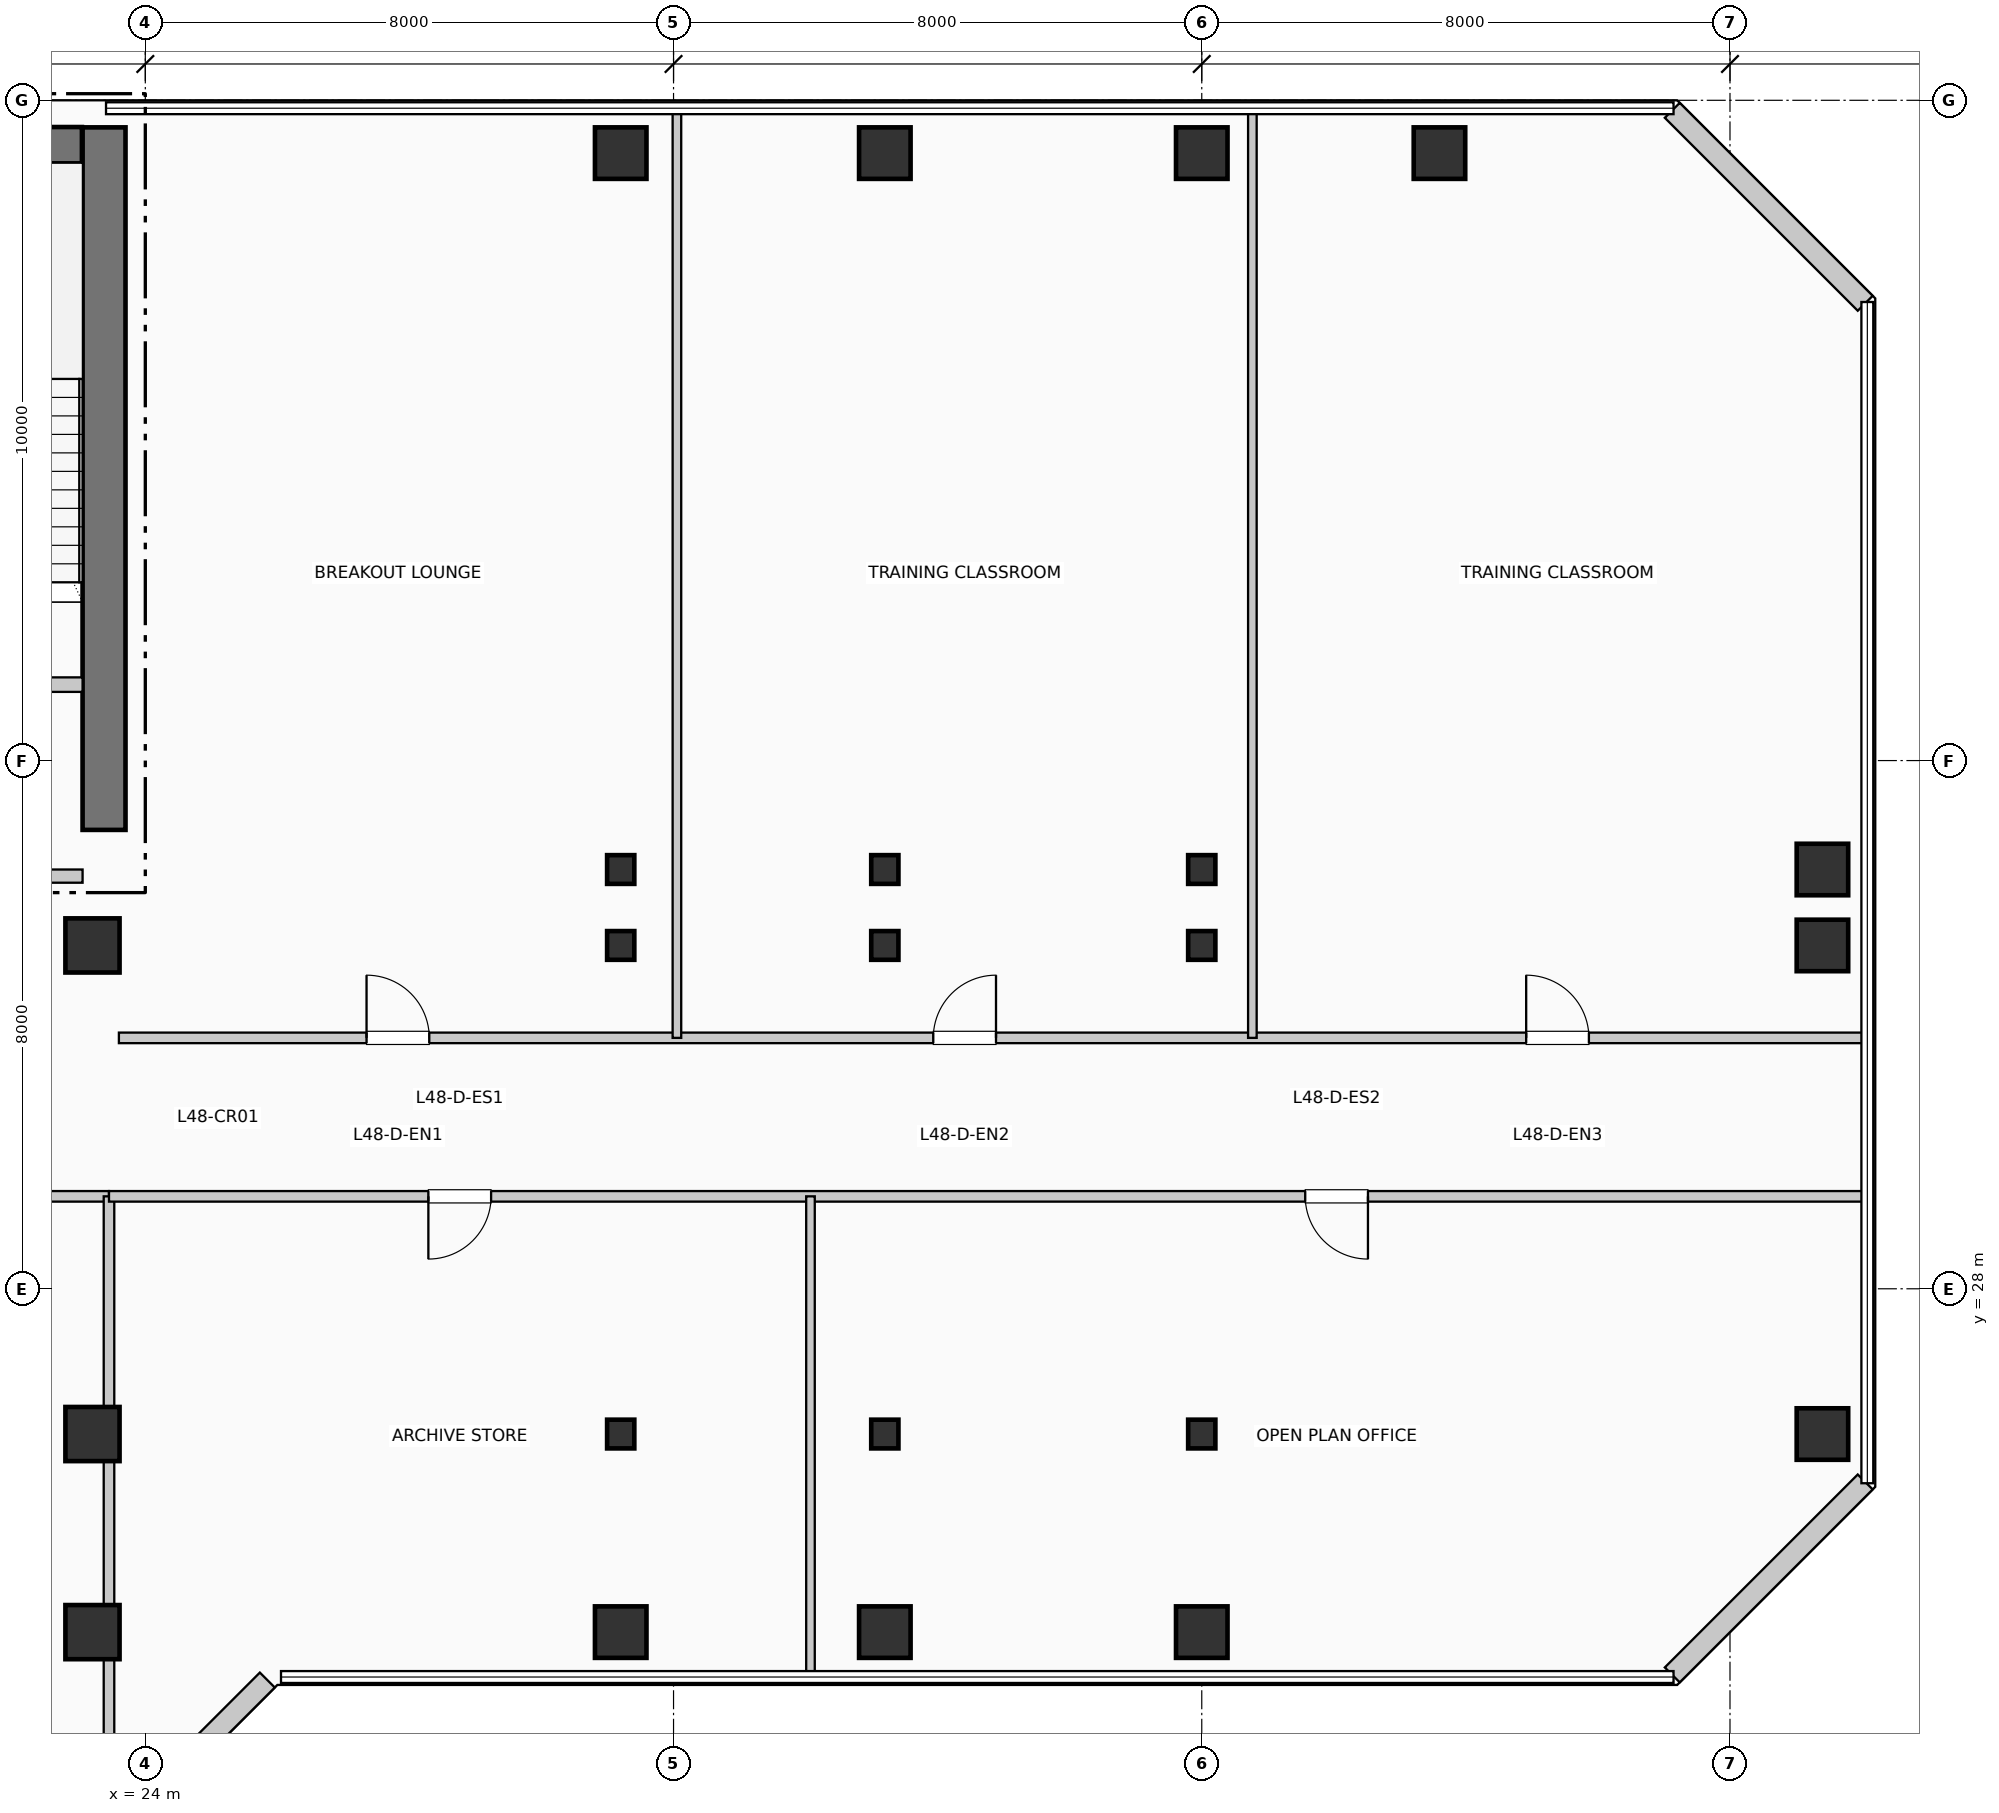
"""IFC4 building model, lengths in metres.
Left out: names, types, materials, properties, quantities, classifications, styles, units other than length and angle.
Written with IfcOpenShell. Run it as: python <this file> out.ifc"""

import sys

from ifc_helpers import new_model, si_unit, direction, frame, frame_2d, origin, origin_2d, place, context, subcontext, project, spatial, rectangle, i_section, extrude, element, fill, save


model = new_model("IFC4")
c1 = context("Model", 3, precision=1e-05, world=origin(), true_north=direction((0.0, 1.0)))
c2 = subcontext(c1, "Body", "Model", "MODEL_VIEW")
j1 = project(units=[si_unit("LENGTHUNIT", "METRE"), si_unit("PLANEANGLEUNIT", "RADIAN")], contexts=[c1])
p1 = place(None, origin())
s1 = spatial("IfcSite", under=j1, at=p1, CompositionType="ELEMENT")
p2 = place(p1, origin())
s2 = spatial("IfcBuilding", under=s1, at=p2, CompositionType="ELEMENT")
p3 = place(p2, frame((0.0, 0.0, 199.32)))
s3 = spatial("IfcBuildingStorey", under=s2, at=p3, CompositionType="ELEMENT", Elevation=199.32)
p4 = place(p3, frame((23.375, 34.95, 0.0), z_axis=(0.0, 0.0, 1.0), x_axis=(0.0, 1.0, 0.0)))
e1 = element("IfcWall", 1, at=p4, inside=s3, PredefinedType="SHEAR", context=c2, shape_type="SweptSolid", body=[
    extrude(rectangle(XDim=10.64, YDim=0.65, at=frame_2d((5.32, 0.0))), origin(), (0.0, 0.0, 1.0), 3.96),
])
p5 = place(p3, frame((19.35, 45.32, 0.0), z_axis=(0.0, 0.0, 1.0), x_axis=(1.0, 0.0, 0.0)))
e2 = element("IfcWall", 2, at=p5, inside=s3, PredefinedType="SHEAR", context=c2, shape_type="SweptSolid", body=[
    extrude(rectangle(XDim=3.69, YDim=0.55, at=frame_2d((1.845, 0.0))), origin(), (0.0, 0.0, 1.0), 3.96),
])
p6 = place(p5, frame((1.15, 0.0, 1.05)))
e3 = element("IfcOpeningElement", 3, at=p6, cuts=e2, PredefinedType="OPENING", context=c2, shape_type="SweptSolid", body=[
    extrude(rectangle(XDim=1.4, YDim=1.8, at=frame_2d((0.7, 0.9))), frame((0.0, 0.285, 0.0), z_axis=(0.0, -1.0, 0.0), x_axis=(1.0, 0.0, 0.0)), (0.0, 0.0, 1.0), 0.57),
])
for number, where, z_axis, x_axis in (
    (4, (23.2, 22.8, 0.0), (0.0, 0.0, 1.0), (1.0, 0.0, 0.0)),
    (5, (23.2, 25.8, 0.0), (0.0, 0.0, 1.0), (1.0, 0.0, 0.0)),
    (6, (23.2, 33.2, 0.0), (0.0, 0.0, 1.0), (1.0, 0.0, 0.0)),
):
    element("IfcColumn", number, at=place(p3, frame(where, z_axis=z_axis, x_axis=x_axis)), inside=s3, PredefinedType="COLUMN", context=c2, shape_type="SweptSolid", body=[
        extrude(rectangle(XDim=0.82, YDim=0.82, at=origin_2d()), origin(), (0.0, 0.0, 1.0), 3.96),
    ])
p7 = place(p3, frame((31.2, 22.8, 0.0), z_axis=(0.0, 0.0, 1.0), x_axis=(1.0, 0.0, 0.0)))
e7 = element("IfcColumn", 7, at=p7, inside=s3, PredefinedType="COLUMN", context=c2, shape_type="SweptSolid", body=[
    extrude(rectangle(XDim=0.78, YDim=0.78, at=origin_2d()), origin(), (0.0, 0.0, 1.0), 3.96),
])
for number, where, z_axis, x_axis in (
    (8, (31.2, 25.8, 0.0), (0.0, 0.0, 1.0), (1.0, 0.0, 0.0)),
    (9, (31.2, 33.2, 0.0), (0.0, 0.0, 1.0), (1.0, 0.0, 0.0)),
    (10, (31.2, 34.35, 0.0), (0.0, 0.0, 1.0), (1.0, 0.0, 0.0)),
):
    element("IfcColumn", number, at=place(p3, frame(where, z_axis=z_axis, x_axis=x_axis)), inside=s3, PredefinedType="COLUMN", context=c2, shape_type="SweptSolid", body=[
        extrude(i_section(OverallWidth=0.412, OverallDepth=0.435, WebThickness=0.027, FlangeThickness=0.043, at=origin_2d()), origin(), (0.0, 0.0, 1.0), 3.96),
    ])
for number, where, z_axis, x_axis in (
    (11, (31.2, 45.2, 0.0), (0.0, 0.0, 1.0), (1.0, 0.0, 0.0)),
    (12, (35.2, 22.8, 0.0), (0.0, 0.0, 1.0), (1.0, 0.0, 0.0)),
):
    element("IfcColumn", number, at=place(p3, frame(where, z_axis=z_axis, x_axis=x_axis)), inside=s3, PredefinedType="COLUMN", context=c2, shape_type="SweptSolid", body=[
        extrude(rectangle(XDim=0.78, YDim=0.78, at=origin_2d()), origin(), (0.0, 0.0, 1.0), 3.96),
    ])
for number, where, z_axis, x_axis in (
    (13, (35.2, 25.8, 0.0), (0.0, 0.0, 1.0), (1.0, 0.0, 0.0)),
    (14, (35.2, 33.2, 0.0), (0.0, 0.0, 1.0), (1.0, 0.0, 0.0)),
    (15, (35.2, 34.35, 0.0), (0.0, 0.0, 1.0), (1.0, 0.0, 0.0)),
):
    element("IfcColumn", number, at=place(p3, frame(where, z_axis=z_axis, x_axis=x_axis)), inside=s3, PredefinedType="COLUMN", context=c2, shape_type="SweptSolid", body=[
        extrude(i_section(OverallWidth=0.412, OverallDepth=0.435, WebThickness=0.027, FlangeThickness=0.043, at=origin_2d()), origin(), (0.0, 0.0, 1.0), 3.96),
    ])
for number, where, z_axis, x_axis in (
    (16, (35.2, 45.2, 0.0), (0.0, 0.0, 1.0), (1.0, 0.0, 0.0)),
    (17, (40.0, 22.8, 0.0), (0.0, 0.0, 1.0), (1.0, 0.0, 0.0)),
):
    element("IfcColumn", number, at=place(p3, frame(where, z_axis=z_axis, x_axis=x_axis)), inside=s3, PredefinedType="COLUMN", context=c2, shape_type="SweptSolid", body=[
        extrude(rectangle(XDim=0.78, YDim=0.78, at=origin_2d()), origin(), (0.0, 0.0, 1.0), 3.96),
    ])
for number, where, z_axis, x_axis in (
    (18, (40.0, 25.8, 0.0), (0.0, 0.0, 1.0), (1.0, 0.0, 0.0)),
    (19, (40.0, 33.2, 0.0), (0.0, 0.0, 1.0), (1.0, 0.0, 0.0)),
    (20, (40.0, 34.35, 0.0), (0.0, 0.0, 1.0), (1.0, 0.0, 0.0)),
):
    element("IfcColumn", number, at=place(p3, frame(where, z_axis=z_axis, x_axis=x_axis)), inside=s3, PredefinedType="COLUMN", context=c2, shape_type="SweptSolid", body=[
        extrude(i_section(OverallWidth=0.412, OverallDepth=0.435, WebThickness=0.027, FlangeThickness=0.043, at=origin_2d()), origin(), (0.0, 0.0, 1.0), 3.96),
    ])
for number, where, z_axis, x_axis in (
    (21, (40.0, 45.2, 0.0), (0.0, 0.0, 1.0), (1.0, 0.0, 0.0)),
    (22, (43.6, 45.2, 0.0), (0.0, 0.0, 1.0), (1.0, 0.0, 0.0)),
    (23, (49.4, 25.8, 0.0), (0.0, 0.0, 1.0), (1.0, 0.0, 0.0)),
    (24, (49.4, 33.2, 0.0), (0.0, 0.0, 1.0), (1.0, 0.0, 0.0)),
    (25, (49.4, 34.35, 0.0), (0.0, 0.0, 1.0), (1.0, 0.0, 0.0)),
):
    element("IfcColumn", number, at=place(p3, frame(where, z_axis=z_axis, x_axis=x_axis)), inside=s3, PredefinedType="COLUMN", context=c2, shape_type="SweptSolid", body=[
        extrude(rectangle(XDim=0.78, YDim=0.78, at=origin_2d()), origin(), (0.0, 0.0, 1.0), 3.96),
    ])
p8 = place(p3, frame((23.926, 20.152, 0.0), z_axis=(0.0, 0.0, 1.0), x_axis=(0.707106781187, 0.707106781187, 0.0)))
e26 = element("IfcWall", 26, at=p8, inside=s3, PredefinedType="SOLIDWALL", context=c2, shape_type="SweptSolid", body=[
    extrude(rectangle(XDim=2.718, YDim=0.32, at=frame_2d((1.359, 0.0))), origin(), (0.0, 0.0, 1.0), 3.71),
])
for number, where, z_axis, x_axis in (
    (27, (47.126, 22.152, 0.0), (0.0, 0.0, 1.0), (0.707, 0.707, 0.0)),
    (28, (50.048, 42.926, 0.0), (0.0, 0.0, 1.0), (-0.707, 0.707, 0.0)),
):
    element("IfcWall", number, at=place(p3, frame(where, z_axis=z_axis, x_axis=x_axis)), inside=s3, PredefinedType="SOLIDWALL", context=c2, shape_type="SweptSolid", body=[
        extrude(rectangle(XDim=4.133, YDim=0.32, at=frame_2d((2.066, 0.0))), origin(), (0.0, 0.0, 1.0), 3.71),
    ])
p9 = place(p3, frame((19.9, 37.15, 0.0), z_axis=(0.0, 0.0, 1.0), x_axis=(1.0, 0.0, 0.0)))
e29 = element("IfcWall", 29, at=p9, inside=s3, PredefinedType="PARTITIONING", context=c2, shape_type="SweptSolid", body=[
    extrude(rectangle(XDim=3.15, YDim=0.22, at=frame_2d((1.575, 0.0))), origin(), (0.0, 0.0, 1.0), 3.71),
])
p10 = place(p9, frame((2.05, 0.0, 0.0), z_axis=(0.0, 0.0, 1.0), x_axis=(-1.0, 0.0, 0.0)))
e30 = element("IfcOpeningElement", 30, at=p10, cuts=e29, PredefinedType="OPENING", context=c2, shape_type="SweptSolid", body=[
    extrude(rectangle(XDim=1.05, YDim=2.15, at=frame_2d((0.525, 1.075))), frame((0.0, 0.12, 0.0), z_axis=(0.0, -1.0, 0.0), x_axis=(1.0, 0.0, 0.0)), (0.0, 0.0, 1.0), 0.24),
])
p11 = place(p3, frame((19.8, 34.25, 0.0), z_axis=(0.0, 0.0, 1.0), x_axis=(1.0, 0.0, 0.0)))
e31 = element("IfcWall", 31, at=p11, inside=s3, PredefinedType="PARTITIONING", context=c2, shape_type="SweptSolid", body=[
    extrude(rectangle(XDim=3.25, YDim=0.2, at=frame_2d((1.625, 0.0))), origin(), (0.0, 0.0, 1.0), 3.71),
])
p12 = place(p11, frame((2.15, 0.0, 0.0), z_axis=(0.0, 0.0, 1.0), x_axis=(-1.0, 0.0, 0.0)))
e32 = element("IfcOpeningElement", 32, at=p12, cuts=e31, PredefinedType="OPENING", context=c2, shape_type="SweptSolid", body=[
    extrude(rectangle(XDim=1.1, YDim=2.15, at=frame_2d((0.55, 1.075))), frame((0.0, 0.11, 0.0), z_axis=(0.0, -1.0, 0.0), x_axis=(1.0, 0.0, 0.0)), (0.0, 0.0, 1.0), 0.22),
])
p13 = place(p3, frame((11.64, 29.4, 0.0), z_axis=(0.0, 0.0, 1.0), x_axis=(1.0, 0.0, 0.0)))
e33 = element("IfcWall", 33, at=p13, inside=s3, PredefinedType="PARTITIONING", context=c2, shape_type="SweptSolid", body=[
    extrude(rectangle(XDim=11.81, YDim=0.16, at=frame_2d((5.905, 0.0))), origin(), (0.0, 0.0, 1.0), 3.365),
])
p14 = place(p3, frame((23.45, 6.84, 0.0), z_axis=(0.0, 0.0, 1.0), x_axis=(0.0, 1.0, 0.0)))
e34 = element("IfcWall", 34, at=p14, inside=s3, PredefinedType="PARTITIONING", context=c2, shape_type="SweptSolid", body=[
    extrude(rectangle(XDim=22.56, YDim=0.16, at=frame_2d((11.28, 0.0))), origin(), (0.0, 0.0, 1.0), 3.095),
])
p15 = place(p3, frame((23.45, 29.4, 0.0), z_axis=(0.0, 0.0, 1.0), x_axis=(1.0, 0.0, 0.0)))
e35 = element("IfcWall", 35, at=p15, inside=s3, PredefinedType="PARTITIONING", context=c2, shape_type="SweptSolid", body=[
    extrude(rectangle(XDim=26.56, YDim=0.16, at=frame_2d((13.28, 0.0))), origin(), (0.0, 0.0, 1.0), 3.365),
])
p16 = place(p15, frame((5.787, 0.0, 0.0), z_axis=(0.0, 0.0, 1.0), x_axis=(-1.0, 0.0, 0.0)))
e36 = element("IfcOpeningElement", 36, at=p16, cuts=e35, PredefinedType="OPENING", context=c2, shape_type="SweptSolid", body=[
    extrude(rectangle(XDim=0.95, YDim=2.15, at=frame_2d((0.475, 1.075))), frame((0.0, 0.09, 0.0), z_axis=(0.0, -1.0, 0.0), x_axis=(1.0, 0.0, 0.0)), (0.0, 0.0, 1.0), 0.18),
])
p17 = place(p15, frame((19.067, 0.0, 0.0), z_axis=(0.0, 0.0, 1.0), x_axis=(-1.0, 0.0, 0.0)))
e37 = element("IfcOpeningElement", 37, at=p17, cuts=e35, PredefinedType="OPENING", context=c2, shape_type="SweptSolid", body=[
    extrude(rectangle(XDim=0.95, YDim=2.15, at=frame_2d((0.475, 1.075))), frame((0.0, 0.09, 0.0), z_axis=(0.0, -1.0, 0.0), x_axis=(1.0, 0.0, 0.0)), (0.0, 0.0, 1.0), 0.18),
])
p18 = place(p3, frame((23.6, 31.8, 0.0), z_axis=(0.0, 0.0, 1.0), x_axis=(1.0, 0.0, 0.0)))
e38 = element("IfcWall", 38, at=p18, inside=s3, PredefinedType="PARTITIONING", context=c2, shape_type="SweptSolid", body=[
    extrude(rectangle(XDim=26.41, YDim=0.16, at=frame_2d((13.205, 0.0))), origin(), (0.0, 0.0, 1.0), 3.71),
])
p19 = place(p18, frame((3.75, 0.0, 0.0)))
e39 = element("IfcOpeningElement", 39, at=p19, cuts=e38, PredefinedType="OPENING", context=c2, shape_type="SweptSolid", body=[
    extrude(rectangle(XDim=0.95, YDim=2.15, at=frame_2d((0.475, 1.075))), frame((0.0, 0.09, 0.0), z_axis=(0.0, -1.0, 0.0), x_axis=(1.0, 0.0, 0.0)), (0.0, 0.0, 1.0), 0.18),
])
p20 = place(p18, frame((12.334, 0.0, 0.0)))
e40 = element("IfcOpeningElement", 40, at=p20, cuts=e38, PredefinedType="OPENING", context=c2, shape_type="SweptSolid", body=[
    extrude(rectangle(XDim=0.95, YDim=2.15, at=frame_2d((0.475, 1.075))), frame((0.0, 0.09, 0.0), z_axis=(0.0, -1.0, 0.0), x_axis=(1.0, 0.0, 0.0)), (0.0, 0.0, 1.0), 0.18),
])
p21 = place(p18, frame((21.313, 0.0, 0.0)))
e41 = element("IfcOpeningElement", 41, at=p21, cuts=e38, PredefinedType="OPENING", context=c2, shape_type="SweptSolid", body=[
    extrude(rectangle(XDim=0.95, YDim=2.15, at=frame_2d((0.475, 1.075))), frame((0.0, 0.09, 0.0), z_axis=(0.0, -1.0, 0.0), x_axis=(1.0, 0.0, 0.0)), (0.0, 0.0, 1.0), 0.18),
])
p22 = place(p3, frame((34.074, 22.19, 0.0), z_axis=(0.0, 0.0, 1.0), x_axis=(0.0, 1.0, 0.0)))
e42 = element("IfcWall", 42, at=p22, inside=s3, PredefinedType="PARTITIONING", context=c2, shape_type="SweptSolid", body=[
    extrude(rectangle(XDim=7.21, YDim=0.13, at=frame_2d((3.605, 0.0))), origin(), (0.0, 0.0, 1.0), 3.71),
])
for number, where, z_axis, x_axis in (
    (43, (32.051, 31.8, 0.0), (0.0, 0.0, 1.0), (0.0, 1.0, 0.0)),
    (44, (40.767, 31.8, 0.0), (0.0, 0.0, 1.0), (0.0, 1.0, 0.0)),
):
    element("IfcWall", number, at=place(p3, frame(where, z_axis=z_axis, x_axis=x_axis)), inside=s3, PredefinedType="PARTITIONING", context=c2, shape_type="SweptSolid", body=[
        extrude(rectangle(XDim=14.01, YDim=0.13, at=frame_2d((7.005, 0.0))), origin(), (0.0, 0.0, 1.0), 3.71),
    ])
p23 = place(p16, origin())
e45 = element("IfcDoor", 45, at=p23, inside=s3, OperationType="SINGLE_SWING_LEFT", PredefinedType="DOOR", context=c2, shape_type="SweptSolid", body=[
    extrude(rectangle(XDim=0.95, YDim=2.15, at=frame_2d((0.475, 1.075))), frame((0.0, 0.025, 0.0), z_axis=(0.0, -1.0, 0.0), x_axis=(1.0, 0.0, 0.0)), (0.0, 0.0, 1.0), 0.05),
])
fill(e36, e45)
p24 = place(p17, origin())
e46 = element("IfcDoor", 46, at=p24, inside=s3, OperationType="SINGLE_SWING_RIGHT", PredefinedType="DOOR", context=c2, shape_type="SweptSolid", body=[
    extrude(rectangle(XDim=0.95, YDim=2.15, at=frame_2d((0.475, 1.075))), frame((0.0, 0.025, 0.0), z_axis=(0.0, -1.0, 0.0), x_axis=(1.0, 0.0, 0.0)), (0.0, 0.0, 1.0), 0.05),
])
fill(e37, e46)
p25 = place(p19, origin())
e47 = element("IfcDoor", 47, at=p25, inside=s3, OperationType="SINGLE_SWING_LEFT", PredefinedType="DOOR", context=c2, shape_type="SweptSolid", body=[
    extrude(rectangle(XDim=0.95, YDim=2.15, at=frame_2d((0.475, 1.075))), frame((0.0, 0.025, 0.0), z_axis=(0.0, -1.0, 0.0), x_axis=(1.0, 0.0, 0.0)), (0.0, 0.0, 1.0), 0.05),
])
fill(e39, e47)
p26 = place(p20, origin())
e48 = element("IfcDoor", 48, at=p26, inside=s3, OperationType="SINGLE_SWING_RIGHT", PredefinedType="DOOR", context=c2, shape_type="SweptSolid", body=[
    extrude(rectangle(XDim=0.95, YDim=2.15, at=frame_2d((0.475, 1.075))), frame((0.0, 0.025, 0.0), z_axis=(0.0, -1.0, 0.0), x_axis=(1.0, 0.0, 0.0)), (0.0, 0.0, 1.0), 0.05),
])
fill(e40, e48)
p27 = place(p21, origin())
e49 = element("IfcDoor", 49, at=p27, inside=s3, OperationType="SINGLE_SWING_LEFT", PredefinedType="DOOR", context=c2, shape_type="SweptSolid", body=[
    extrude(rectangle(XDim=0.95, YDim=2.15, at=frame_2d((0.475, 1.075))), frame((0.0, 0.025, 0.0), z_axis=(0.0, -1.0, 0.0), x_axis=(1.0, 0.0, 0.0)), (0.0, 0.0, 1.0), 0.05),
])
fill(e41, e49)
save(model, sys.argv[1])
